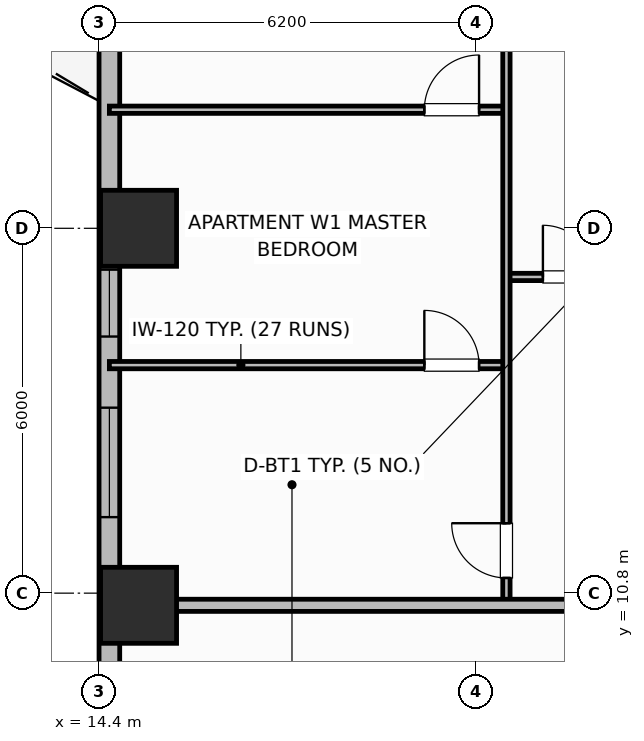
"""IFC4 building model, lengths in metres.
Left out: names, types, materials, properties, quantities, classifications, styles, units other than length and angle.
Written with IfcOpenShell. Run it as: python <this file> out.ifc"""

import sys

from ifc_helpers import new_model, si_unit, direction, frame, frame_2d, origin, origin_2d, place, context, subcontext, project, spatial, rectangle, extrude, element, fill, save


model = new_model("IFC4")
c1 = context("Model", 3, precision=1e-05, world=origin(), true_north=direction((0.0, 1.0)))
c2 = subcontext(c1, "Body", "Model", "MODEL_VIEW")
j1 = project(units=[si_unit("LENGTHUNIT", "METRE"), si_unit("PLANEANGLEUNIT", "RADIAN")], contexts=[c1])
p1 = place(None, origin())
s1 = spatial("IfcSite", under=j1, at=p1, CompositionType="ELEMENT")
p2 = place(p1, origin())
s2 = spatial("IfcBuilding", under=s1, at=p2, CompositionType="ELEMENT")
p3 = place(p2, frame((0.0, 0.0, 43.6)))
s3 = spatial("IfcBuildingStorey", under=s2, at=p3, CompositionType="ELEMENT", Elevation=43.6)
for number, where, z_axis, x_axis in (
    (1, (15.05, 10.6, 0.0), (0.0, 0.0, 1.0), (1.0, 0.0, 0.0)),
    (2, (15.05, 16.8, 0.0), (0.0, 0.0, 1.0), (1.0, 0.0, 0.0)),
):
    element("IfcColumn", number, at=place(p3, frame(where, z_axis=z_axis, x_axis=x_axis)), inside=s3, PredefinedType="COLUMN", context=c2, shape_type="SweptSolid", body=[
        extrude(rectangle(XDim=1.25, YDim=1.25, at=origin_2d()), origin(), (0.0, 0.0, 1.0), 3.7),
    ])
p4 = place(p3, frame((14.57, 23.8, 0.0), z_axis=(0.0, 0.0, 1.0), x_axis=(0.0, -1.0, 0.0)))
e3 = element("IfcWall", 3, at=p4, inside=s3, PredefinedType="SOLIDWALL", context=c2, shape_type="SweptSolid", body=[
    extrude(rectangle(XDim=14.8, YDim=0.34, at=frame_2d((7.4, 0.0))), origin(), (0.0, 0.0, 1.0), 2.7),
])
p5 = place(p4, frame((1.7, 0.0, 0.0)))
e4 = element("IfcOpeningElement", 4, at=p5, cuts=e3, PredefinedType="OPENING", context=c2, shape_type="SweptSolid", body=[
    extrude(rectangle(XDim=1.6, YDim=2.1, at=frame_2d((0.8, 1.05))), frame((0.0, 0.18, 0.0), z_axis=(0.0, -1.0, 0.0), x_axis=(1.0, 0.0, 0.0)), (0.0, 0.0, 1.0), 0.36),
])
p6 = place(p4, frame((7.68, 0.0, 0.89)))
e5 = element("IfcOpeningElement", 5, at=p6, cuts=e3, PredefinedType="OPENING", context=c2, shape_type="SweptSolid", body=[
    extrude(rectangle(XDim=1.1, YDim=1.65, at=frame_2d((0.55, 0.825))), frame((0.0, 0.18, 0.0), z_axis=(0.0, -1.0, 0.0), x_axis=(1.0, 0.0, 0.0)), (0.0, 0.0, 1.0), 0.36),
])
p7 = place(p4, frame((9.95, 0.0, 0.73)))
e6 = element("IfcOpeningElement", 6, at=p7, cuts=e3, PredefinedType="OPENING", context=c2, shape_type="SweptSolid", body=[
    extrude(rectangle(XDim=1.8, YDim=1.85, at=frame_2d((0.9, 0.925))), frame((0.0, 0.18, 0.0), z_axis=(0.0, -1.0, 0.0), x_axis=(1.0, 0.0, 0.0)), (0.0, 0.0, 1.0), 0.36),
])
p8 = place(p3, frame((21.1, 16.0, 0.0), z_axis=(0.0, 0.0, 1.0), x_axis=(1.0, 0.0, 0.0)))
e7 = element("IfcWall", 7, at=p8, inside=s3, PredefinedType="PARTITIONING", context=c2, shape_type="SweptSolid", body=[
    extrude(rectangle(XDim=2.25, YDim=0.12, at=frame_2d((1.125, 0.0))), origin(), (0.0, 0.0, 1.0), 2.53),
])
p9 = place(p8, frame((0.6, 0.0, 0.0)))
e8 = element("IfcOpeningElement", 8, at=p9, cuts=e7, PredefinedType="OPENING", context=c2, shape_type="SweptSolid", body=[
    extrude(rectangle(XDim=0.85, YDim=2.1, at=frame_2d((0.425, 1.05))), frame((0.0, 0.07, 0.0), z_axis=(0.0, -1.0, 0.0), x_axis=(1.0, 0.0, 0.0)), (0.0, 0.0, 1.0), 0.14),
])
p10 = place(p3, frame((14.57, 14.55, 0.0), z_axis=(0.0, 0.0, 1.0), x_axis=(1.0, 0.0, 0.0)))
e9 = element("IfcWall", 9, at=p10, inside=s3, PredefinedType="PARTITIONING", context=c2, shape_type="SweptSolid", body=[
    extrude(rectangle(XDim=6.53, YDim=0.12, at=frame_2d((3.265, 0.0))), origin(), (0.0, 0.0, 1.0), 2.53),
])
p11 = place(p10, frame((5.18, 0.0, 0.0)))
e10 = element("IfcOpeningElement", 10, at=p11, cuts=e9, PredefinedType="OPENING", context=c2, shape_type="SweptSolid", body=[
    extrude(rectangle(XDim=0.9, YDim=2.1, at=frame_2d((0.45, 1.05))), frame((0.0, 0.07, 0.0), z_axis=(0.0, -1.0, 0.0), x_axis=(1.0, 0.0, 0.0)), (0.0, 0.0, 1.0), 0.14),
])
p12 = place(p3, frame((14.57, 18.75, 0.0), z_axis=(0.0, 0.0, 1.0), x_axis=(1.0, 0.0, 0.0)))
e11 = element("IfcWall", 11, at=p12, inside=s3, PredefinedType="PARTITIONING", context=c2, shape_type="SweptSolid", body=[
    extrude(rectangle(XDim=6.53, YDim=0.12, at=frame_2d((3.265, 0.0))), origin(), (0.0, 0.0, 1.0), 2.53),
])
p13 = place(p12, frame((5.18, 0.0, 0.0)))
e12 = element("IfcOpeningElement", 12, at=p13, cuts=e11, PredefinedType="OPENING", context=c2, shape_type="SweptSolid", body=[
    extrude(rectangle(XDim=0.9, YDim=2.1, at=frame_2d((0.45, 1.05))), frame((0.0, 0.07, 0.0), z_axis=(0.0, -1.0, 0.0), x_axis=(1.0, 0.0, 0.0)), (0.0, 0.0, 1.0), 0.14),
])
p14 = place(p3, frame((21.1, 10.64, 0.0), z_axis=(0.0, 0.0, 1.0), x_axis=(0.0, 1.0, 0.0)))
e13 = element("IfcWall", 13, at=p14, inside=s3, PredefinedType="PARTITIONING", context=c2, shape_type="SweptSolid", body=[
    extrude(rectangle(XDim=12.02, YDim=0.12, at=frame_2d((6.01, 0.0))), origin(), (0.0, 0.0, 1.0), 2.53),
])
p15 = place(p14, frame((0.41, 0.0, 0.0)))
e14 = element("IfcOpeningElement", 14, at=p15, cuts=e13, PredefinedType="OPENING", context=c2, shape_type="SweptSolid", body=[
    extrude(rectangle(XDim=0.9, YDim=2.1, at=frame_2d((0.45, 1.05))), frame((0.0, 0.07, 0.0), z_axis=(0.0, -1.0, 0.0), x_axis=(1.0, 0.0, 0.0)), (0.0, 0.0, 1.0), 0.14),
])
p16 = place(p14, frame((10.185, 0.0, 0.0)))
e15 = element("IfcOpeningElement", 15, at=p16, cuts=e13, PredefinedType="OPENING", context=c2, shape_type="SweptSolid", body=[
    extrude(rectangle(XDim=0.82, YDim=2.08, at=frame_2d((0.41, 1.04))), frame((0.0, 0.07, 0.0), z_axis=(0.0, -1.0, 0.0), x_axis=(1.0, 0.0, 0.0)), (0.0, 0.0, 1.0), 0.14),
])
p17 = place(p3, frame((14.99, 10.6, 0.0), z_axis=(0.0, 0.0, 1.0), x_axis=(1.0, 0.0, 0.0)))
e16 = element("IfcWall", 16, at=p17, inside=s3, PredefinedType="PARTITIONING", context=c2, shape_type="SweptSolid", body=[
    extrude(rectangle(XDim=8.36, YDim=0.2, at=frame_2d((4.18, 0.0))), origin(), (0.0, 0.0, 1.0), 2.53),
])
p18 = place(p6, origin())
e17 = element("IfcWindow", 17, at=p18, inside=s3, PartitioningType="SINGLE_PANEL", PredefinedType="WINDOW", context=c2, shape_type="SweptSolid", body=[
    extrude(rectangle(XDim=1.1, YDim=1.65, at=frame_2d((0.55, 0.825))), frame((0.0, 0.03, 0.0), z_axis=(0.0, -1.0, 0.0), x_axis=(1.0, 0.0, 0.0)), (0.0, 0.0, 1.0), 0.06),
])
fill(e5, e17)
p19 = place(p7, origin())
e18 = element("IfcWindow", 18, at=p19, inside=s3, PartitioningType="SINGLE_PANEL", PredefinedType="WINDOW", context=c2, shape_type="SweptSolid", body=[
    extrude(rectangle(XDim=1.8, YDim=1.85, at=frame_2d((0.9, 0.925))), frame((0.0, 0.03, 0.0), z_axis=(0.0, -1.0, 0.0), x_axis=(1.0, 0.0, 0.0)), (0.0, 0.0, 1.0), 0.06),
])
fill(e6, e18)
p20 = place(p9, origin())
e19 = element("IfcDoor", 19, at=p20, inside=s3, OperationType="SINGLE_SWING_LEFT", PredefinedType="DOOR", context=c2, shape_type="SweptSolid", body=[
    extrude(rectangle(XDim=0.85, YDim=2.1, at=frame_2d((0.425, 1.05))), frame((0.0, 0.025, 0.0), z_axis=(0.0, -1.0, 0.0), x_axis=(1.0, 0.0, 0.0)), (0.0, 0.0, 1.0), 0.05),
])
fill(e8, e19)
p21 = place(p11, origin())
e20 = element("IfcDoor", 20, at=p21, inside=s3, OperationType="SINGLE_SWING_LEFT", PredefinedType="DOOR", context=c2, shape_type="SweptSolid", body=[
    extrude(rectangle(XDim=0.9, YDim=2.1, at=frame_2d((0.45, 1.05))), frame((0.0, 0.025, 0.0), z_axis=(0.0, -1.0, 0.0), x_axis=(1.0, 0.0, 0.0)), (0.0, 0.0, 1.0), 0.05),
])
fill(e10, e20)
p22 = place(p13, origin())
e21 = element("IfcDoor", 21, at=p22, inside=s3, OperationType="SINGLE_SWING_RIGHT", PredefinedType="DOOR", context=c2, shape_type="SweptSolid", body=[
    extrude(rectangle(XDim=0.9, YDim=2.1, at=frame_2d((0.45, 1.05))), frame((0.0, 0.025, 0.0), z_axis=(0.0, -1.0, 0.0), x_axis=(1.0, 0.0, 0.0)), (0.0, 0.0, 1.0), 0.05),
])
fill(e12, e21)
p23 = place(p15, origin())
e22 = element("IfcDoor", 22, at=p23, inside=s3, OperationType="SINGLE_SWING_RIGHT", PredefinedType="DOOR", context=c2, shape_type="SweptSolid", body=[
    extrude(rectangle(XDim=0.9, YDim=2.1, at=frame_2d((0.45, 1.05))), frame((0.0, 0.025, 0.0), z_axis=(0.0, -1.0, 0.0), x_axis=(1.0, 0.0, 0.0)), (0.0, 0.0, 1.0), 0.05),
])
fill(e14, e22)
save(model, sys.argv[1])
